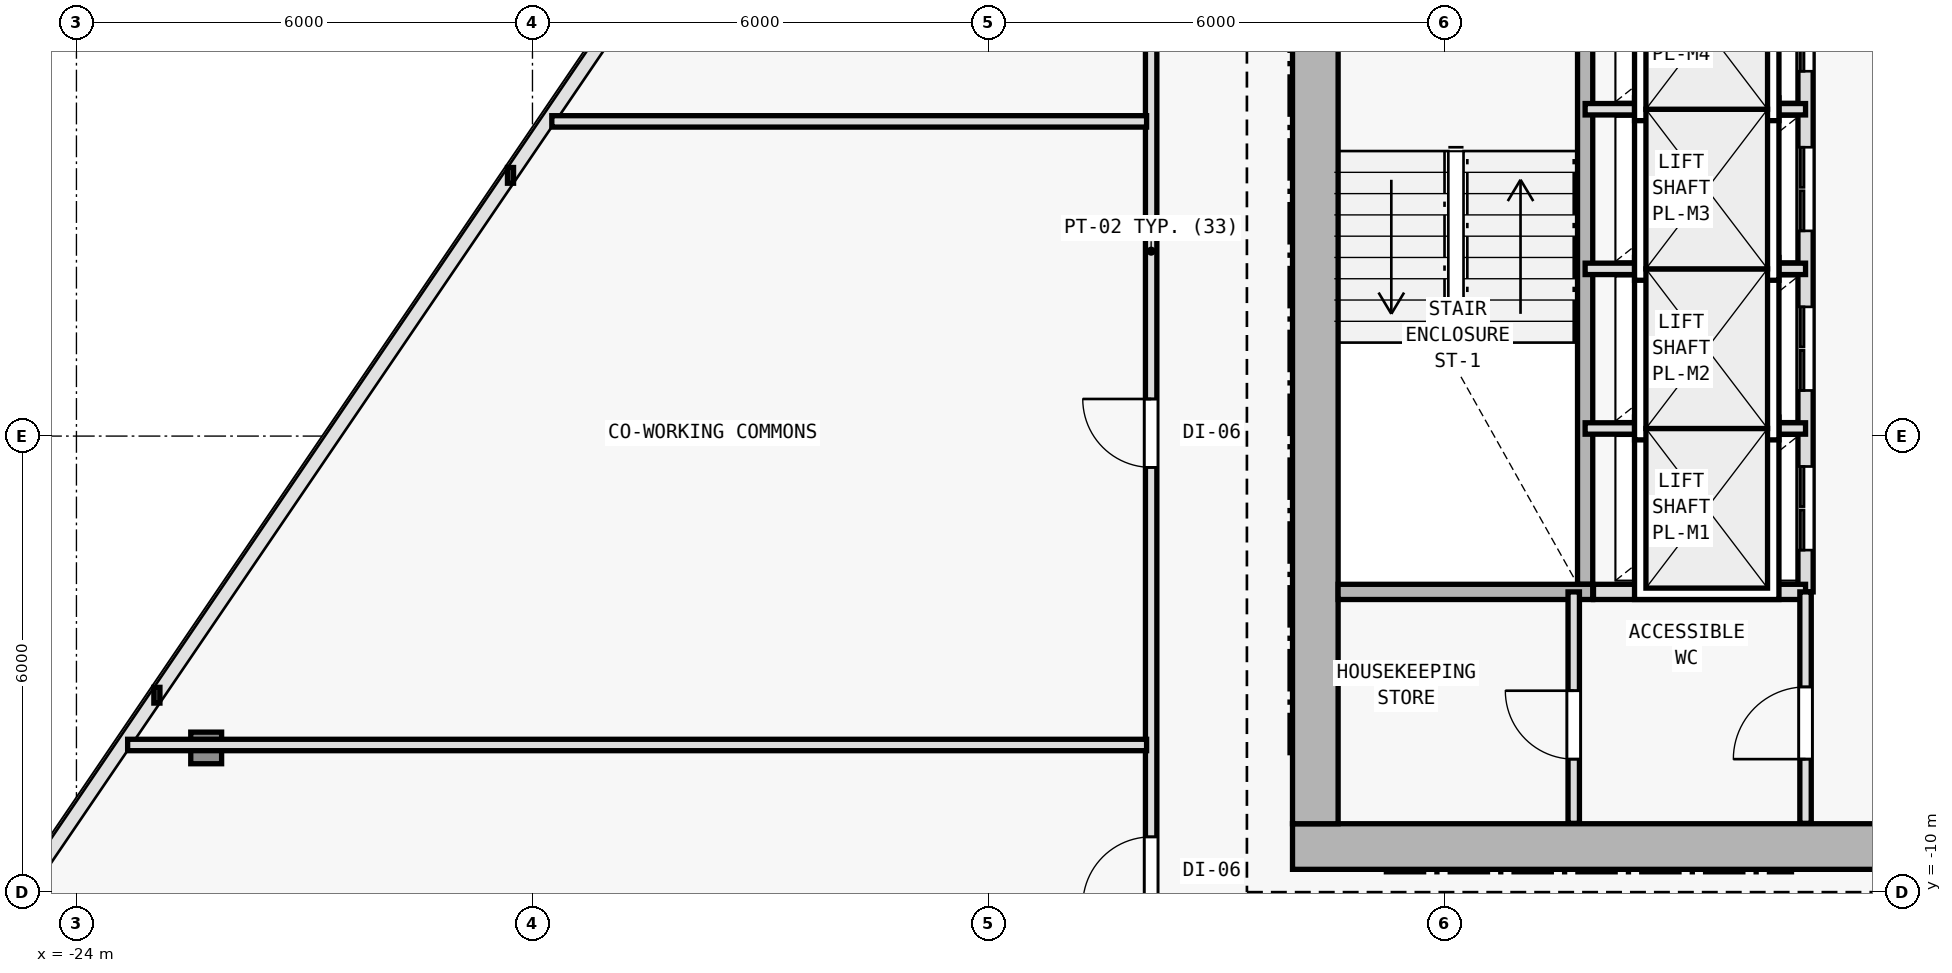
"""IFC4 building model, lengths in metres.
Left out: names, types, materials, properties, quantities, classifications, styles, units other than length and angle.
Written with IfcOpenShell. Run it as: python <this file> out.ifc"""

import sys

from ifc_helpers import new_model, si_unit, direction, frame, frame_2d, origin, origin_2d, place, context, subcontext, project, spatial, rectangle, i_section, extrude, element, fill, save


model = new_model("IFC4")
c1 = context("Model", 3, precision=1e-05, world=origin(), true_north=direction((0.0, 1.0)))
c2 = subcontext(c1, "Body", "Model", "MODEL_VIEW")
j1 = project(units=[si_unit("LENGTHUNIT", "METRE"), si_unit("PLANEANGLEUNIT", "RADIAN")], contexts=[c1])
p1 = place(None, origin())
s1 = spatial("IfcSite", under=j1, at=p1, CompositionType="ELEMENT")
p2 = place(p1, origin())
s2 = spatial("IfcBuilding", under=s1, at=p2, CompositionType="ELEMENT")
p3 = place(p2, frame((0.0, 0.0, 111.3)))
s3 = spatial("IfcBuildingStorey", under=s2, at=p3, CompositionType="ELEMENT", Elevation=111.3)
p4 = place(p3, frame((-7.7, -9.4, 0.0), z_axis=(0.0, 0.0, 1.0), x_axis=(1.0, 0.0, 0.0)))
e1 = element("IfcColumn", 1, at=p4, inside=s3, PredefinedType="COLUMN", context=c2, shape_type="SweptSolid", body=[
    extrude(i_section(OverallWidth=0.409, OverallDepth=0.425, WebThickness=0.021, FlangeThickness=0.034, FilletRadius=0.015, at=origin_2d()), origin(), (0.0, 0.0, 1.0), 3.6),
])
p5 = place(p3, frame((-22.293, -8.103, 0.005), z_axis=(0.025222449659, 0.021619242565, 0.999448065876), x_axis=(-0.650791373456, 0.759256602365, 0.0)))
e2 = element("IfcColumn", 2, at=p5, inside=s3, PredefinedType="COLUMN", context=c2, shape_type="SweptSolid", body=[
    extrude(i_section(OverallWidth=0.406, OverallDepth=0.416, WebThickness=0.019, FlangeThickness=0.031, FilletRadius=0.015, at=origin_2d()), origin(), (0.0, 0.0, 1.0), 3.591),
])
p6 = place(p3, frame((-8.0, -9.4, 0.0), z_axis=(0.0, 0.0, 1.0), x_axis=(1.0, 0.0, 0.0)))
e3 = element("IfcWall", 3, at=p6, inside=s3, PredefinedType="SHEAR", context=c2, shape_type="SweptSolid", body=[
    extrude(rectangle(XDim=16.0, YDim=0.6, at=frame_2d((8.0, 0.0))), origin(), (0.0, 0.0, 1.0), 3.35),
])
p7 = place(p6, frame((9.65, 0.0, 0.0)))
e4 = element("IfcOpeningElement", 4, at=p7, cuts=e3, PredefinedType="OPENING", context=c2, shape_type="SweptSolid", body=[
    extrude(rectangle(XDim=1.5, YDim=2.2, at=frame_2d((0.75, 1.1))), frame((0.0, 0.31, 0.0), z_axis=(0.0, -1.0, 0.0), x_axis=(1.0, 0.0, 0.0)), (0.0, 0.0, 1.0), 0.62),
])
p8 = place(p3, frame((-7.7, -9.1, 0.0), z_axis=(0.0, 0.0, 1.0), x_axis=(0.0, 1.0, 0.0)))
e5 = element("IfcWall", 5, at=p8, inside=s3, PredefinedType="SHEAR", context=c2, shape_type="SweptSolid", body=[
    extrude(rectangle(XDim=19.0, YDim=0.6, at=frame_2d((9.5, 0.0))), origin(), (0.0, 0.0, 1.0), 3.35),
])
p9 = place(p8, frame((12.65, 0.0, 0.0)))
e6 = element("IfcOpeningElement", 6, at=p9, cuts=e5, PredefinedType="OPENING", context=c2, shape_type="SweptSolid", body=[
    extrude(rectangle(XDim=1.1, YDim=2.15, at=frame_2d((0.55, 1.075))), frame((0.0, 0.31, 0.0), z_axis=(0.0, -1.0, 0.0), x_axis=(1.0, 0.0, 0.0)), (0.0, 0.0, 1.0), 0.62),
])
p10 = place(p3, frame((-4.15, -5.95, 0.0), z_axis=(0.0, 0.0, 1.0), x_axis=(0.0, 1.0, 0.0)))
e7 = element("IfcWall", 7, at=p10, inside=s3, PredefinedType="SOLIDWALL", context=c2, shape_type="SweptSolid", body=[
    extrude(rectangle(XDim=7.2, YDim=0.2, at=frame_2d((3.6, 0.0))), origin(), (0.0, 0.0, 1.0), 3.35),
])
p11 = place(p3, frame((-1.25, -6.05, 0.0), z_axis=(0.0, 0.0, 1.0), x_axis=(0.0, 1.0, 0.0)))
e8 = element("IfcWall", 8, at=p11, inside=s3, PredefinedType="SOLIDWALL", context=c2, shape_type="SweptSolid", body=[
    extrude(rectangle(XDim=8.7, YDim=0.2, at=frame_2d((4.35, 0.0))), origin(), (0.0, 0.0, 1.0), 3.35),
])
p12 = place(p11, frame((0.55, 0.0, 0.0)))
e9 = element("IfcOpeningElement", 9, at=p12, cuts=e8, PredefinedType="OPENING", context=c2, shape_type="SweptSolid", body=[
    extrude(rectangle(XDim=1.1, YDim=2.15, at=frame_2d((0.55, 1.075))), frame((0.0, 0.11, 0.0), z_axis=(0.0, -1.0, 0.0), x_axis=(1.0, 0.0, 0.0)), (0.0, 0.0, 1.0), 0.22),
])
p13 = place(p11, frame((2.65, 0.0, 0.0)))
e10 = element("IfcOpeningElement", 10, at=p13, cuts=e8, PredefinedType="OPENING", context=c2, shape_type="SweptSolid", body=[
    extrude(rectangle(XDim=1.1, YDim=2.15, at=frame_2d((0.55, 1.075))), frame((0.0, 0.11, 0.0), z_axis=(0.0, -1.0, 0.0), x_axis=(1.0, 0.0, 0.0)), (0.0, 0.0, 1.0), 0.22),
])
p14 = place(p11, frame((4.75, 0.0, 0.0)))
e11 = element("IfcOpeningElement", 11, at=p14, cuts=e8, PredefinedType="OPENING", context=c2, shape_type="SweptSolid", body=[
    extrude(rectangle(XDim=1.1, YDim=2.15, at=frame_2d((0.55, 1.075))), frame((0.0, 0.11, 0.0), z_axis=(0.0, -1.0, 0.0), x_axis=(1.0, 0.0, 0.0)), (0.0, 0.0, 1.0), 0.22),
])
p15 = place(p11, frame((6.85, 0.0, 0.0)))
e12 = element("IfcOpeningElement", 12, at=p15, cuts=e8, PredefinedType="OPENING", context=c2, shape_type="SweptSolid", body=[
    extrude(rectangle(XDim=1.1, YDim=2.15, at=frame_2d((0.55, 1.075))), frame((0.0, 0.11, 0.0), z_axis=(0.0, -1.0, 0.0), x_axis=(1.0, 0.0, 0.0)), (0.0, 0.0, 1.0), 0.22),
])
for number, where, z_axis, x_axis in (
    (13, (-4.15, -3.9, 0.0), (0.0, 0.0, 1.0), (1.0, 0.0, 0.0)),
    (14, (-4.15, -1.8, 0.0), (0.0, 0.0, 1.0), (1.0, 0.0, 0.0)),
    (15, (-4.15, 0.3, 0.0), (0.0, 0.0, 1.0), (1.0, 0.0, 0.0)),
):
    element("IfcWall", number, at=place(p3, frame(where, z_axis=z_axis, x_axis=x_axis)), inside=s3, PredefinedType="PARTITIONING", context=c2, shape_type="SweptSolid", body=[
        extrude(rectangle(XDim=2.9, YDim=0.15, at=frame_2d((1.45, 0.0))), origin(), (0.0, 0.0, 1.0), 3.35),
    ])
p16 = place(p3, frame((-7.4, -6.05, 0.0), z_axis=(0.0, 0.0, 1.0), x_axis=(1.0, 0.0, 0.0)))
e16 = element("IfcWall", 16, at=p16, inside=s3, PredefinedType="SOLIDWALL", context=c2, shape_type="SweptSolid", body=[
    extrude(rectangle(XDim=3.35, YDim=0.2, at=frame_2d((1.675, 0.0))), origin(), (0.0, 0.0, 1.0), 3.35),
])
p17 = place(p3, frame((-4.04, -6.05, 0.0), z_axis=(0.0, 0.0, 1.0), x_axis=(1.0, 0.0, 0.0)))
e17 = element("IfcWall", 17, at=p17, inside=s3, PredefinedType="SOLIDWALL", context=c2, shape_type="SweptSolid", body=[
    extrude(rectangle(XDim=2.79, YDim=0.2, at=frame_2d((1.395, 0.0))), origin(), (0.0, 0.0, 1.0), 3.35),
])
p18 = place(p3, frame((-1.25, -9.095, 0.0), z_axis=(0.0, 0.0, 1.0), x_axis=(0.0, 1.0, 0.0)))
e18 = element("IfcWall", 18, at=p18, inside=s3, PredefinedType="PARTITIONING", context=c2, shape_type="SweptSolid", body=[
    extrude(rectangle(XDim=3.045, YDim=0.15, at=frame_2d((1.522, 0.0))), origin(), (0.0, 0.0, 1.0), 3.35),
])
p19 = place(p18, frame((0.845, 0.0, 0.0)))
e19 = element("IfcOpeningElement", 19, at=p19, cuts=e18, PredefinedType="OPENING", context=c2, shape_type="SweptSolid", body=[
    extrude(rectangle(XDim=0.95, YDim=2.1, at=frame_2d((0.475, 1.05))), frame((0.0, 0.085, 0.0), z_axis=(0.0, -1.0, 0.0), x_axis=(1.0, 0.0, 0.0)), (0.0, 0.0, 1.0), 0.17),
])
p20 = place(p3, frame((-4.3, -9.095, 0.0), z_axis=(0.0, 0.0, 1.0), x_axis=(0.0, 1.0, 0.0)))
e20 = element("IfcWall", 20, at=p20, inside=s3, PredefinedType="PARTITIONING", context=c2, shape_type="SweptSolid", body=[
    extrude(rectangle(XDim=3.045, YDim=0.15, at=frame_2d((1.522, 0.0))), origin(), (0.0, 0.0, 1.0), 3.35),
])
p21 = place(p20, frame((0.845, 0.0, 0.0)))
e21 = element("IfcOpeningElement", 21, at=p21, cuts=e20, PredefinedType="OPENING", context=c2, shape_type="SweptSolid", body=[
    extrude(rectangle(XDim=0.9, YDim=2.1, at=frame_2d((0.45, 1.05))), frame((0.0, 0.085, 0.0), z_axis=(0.0, -1.0, 0.0), x_axis=(1.0, 0.0, 0.0)), (0.0, 0.0, 1.0), 0.17),
])
p22 = place(p3, frame((-9.86, -11.56, 0.0), z_axis=(0.0, 0.0, 1.0), x_axis=(0.0, 1.0, 0.0)))
e22 = element("IfcWall", 22, at=p22, inside=s3, PredefinedType="PARTITIONING", context=c2, shape_type="SweptSolid", body=[
    extrude(rectangle(XDim=19.986, YDim=0.15, at=frame_2d((9.993, 0.0))), origin(), (0.0, 0.0, 1.0), 2.705),
])
p23 = place(p22, frame((7.148, 0.0, 0.0)))
e23 = element("IfcOpeningElement", 23, at=p23, cuts=e22, PredefinedType="OPENING", context=c2, shape_type="SweptSolid", body=[
    extrude(rectangle(XDim=0.9, YDim=2.1, at=frame_2d((0.45, 1.05))), frame((0.0, 0.085, 0.0), z_axis=(0.0, -1.0, 0.0), x_axis=(1.0, 0.0, 0.0)), (0.0, 0.0, 1.0), 0.17),
])
p24 = place(p22, frame((1.387, 0.0, 0.0)))
e24 = element("IfcOpeningElement", 24, at=p24, cuts=e22, PredefinedType="OPENING", context=c2, shape_type="SweptSolid", body=[
    extrude(rectangle(XDim=0.9, YDim=2.1, at=frame_2d((0.45, 1.05))), frame((0.0, 0.085, 0.0), z_axis=(0.0, -1.0, 0.0), x_axis=(1.0, 0.0, 0.0)), (0.0, 0.0, 1.0), 0.17),
])
p25 = place(p3, frame((-9.92, -8.064, 0.0), z_axis=(0.0, 0.0, 1.0), x_axis=(-1.0, 0.0, 0.0)))
e25 = element("IfcWall", 25, at=p25, inside=s3, PredefinedType="PARTITIONING", context=c2, shape_type="SweptSolid", body=[
    extrude(rectangle(XDim=13.406, YDim=0.15, at=frame_2d((6.703, 0.0))), origin(), (0.0, 0.0, 1.0), 2.705),
])
p26 = place(p3, frame((-9.92, 0.14, 0.0), z_axis=(0.0, 0.0, 1.0), x_axis=(-1.0, 0.0, 0.0)))
e26 = element("IfcWall", 26, at=p26, inside=s3, PredefinedType="PARTITIONING", context=c2, shape_type="SweptSolid", body=[
    extrude(rectangle(XDim=7.825, YDim=0.15, at=frame_2d((3.913, 0.0))), origin(), (0.0, 0.0, 1.0), 2.835),
])
p27 = place(p12, origin())
e27 = element("IfcDoor", 27, at=p27, inside=s3, OperationType="DOUBLE_DOOR_SLIDING", PredefinedType="DOOR", context=c2, shape_type="SweptSolid", body=[
    extrude(rectangle(XDim=1.1, YDim=2.15, at=frame_2d((0.55, 1.075))), frame((0.0, 0.025, 0.0), z_axis=(0.0, -1.0, 0.0), x_axis=(1.0, 0.0, 0.0)), (0.0, 0.0, 1.0), 0.05),
])
fill(e9, e27)
p28 = place(p13, origin())
e28 = element("IfcDoor", 28, at=p28, inside=s3, OperationType="DOUBLE_DOOR_SLIDING", PredefinedType="DOOR", context=c2, shape_type="SweptSolid", body=[
    extrude(rectangle(XDim=1.1, YDim=2.15, at=frame_2d((0.55, 1.075))), frame((0.0, 0.025, 0.0), z_axis=(0.0, -1.0, 0.0), x_axis=(1.0, 0.0, 0.0)), (0.0, 0.0, 1.0), 0.05),
])
fill(e10, e28)
p29 = place(p14, origin())
e29 = element("IfcDoor", 29, at=p29, inside=s3, OperationType="DOUBLE_DOOR_SLIDING", PredefinedType="DOOR", context=c2, shape_type="SweptSolid", body=[
    extrude(rectangle(XDim=1.1, YDim=2.15, at=frame_2d((0.55, 1.075))), frame((0.0, 0.025, 0.0), z_axis=(0.0, -1.0, 0.0), x_axis=(1.0, 0.0, 0.0)), (0.0, 0.0, 1.0), 0.05),
])
fill(e11, e29)
p30 = place(p15, origin())
e30 = element("IfcDoor", 30, at=p30, inside=s3, OperationType="DOUBLE_DOOR_SLIDING", PredefinedType="DOOR", context=c2, shape_type="SweptSolid", body=[
    extrude(rectangle(XDim=1.1, YDim=2.15, at=frame_2d((0.55, 1.075))), frame((0.0, 0.025, 0.0), z_axis=(0.0, -1.0, 0.0), x_axis=(1.0, 0.0, 0.0)), (0.0, 0.0, 1.0), 0.05),
])
fill(e12, e30)
p31 = place(p19, origin())
e31 = element("IfcDoor", 31, at=p31, inside=s3, OperationType="SINGLE_SWING_LEFT", PredefinedType="DOOR", context=c2, shape_type="SweptSolid", body=[
    extrude(rectangle(XDim=0.95, YDim=2.1, at=frame_2d((0.475, 1.05))), frame((0.0, 0.025, 0.0), z_axis=(0.0, -1.0, 0.0), x_axis=(1.0, 0.0, 0.0)), (0.0, 0.0, 1.0), 0.05),
])
fill(e19, e31)
p32 = place(p21, origin())
e32 = element("IfcDoor", 32, at=p32, inside=s3, OperationType="SINGLE_SWING_RIGHT", PredefinedType="DOOR", context=c2, shape_type="SweptSolid", body=[
    extrude(rectangle(XDim=0.9, YDim=2.1, at=frame_2d((0.45, 1.05))), frame((0.0, 0.025, 0.0), z_axis=(0.0, -1.0, 0.0), x_axis=(1.0, 0.0, 0.0)), (0.0, 0.0, 1.0), 0.05),
])
fill(e21, e32)
p33 = place(p23, origin())
e33 = element("IfcDoor", 33, at=p33, inside=s3, OperationType="SINGLE_SWING_RIGHT", PredefinedType="DOOR", context=c2, shape_type="SweptSolid", body=[
    extrude(rectangle(XDim=0.9, YDim=2.1, at=frame_2d((0.45, 1.05))), frame((0.0, 0.025, 0.0), z_axis=(0.0, -1.0, 0.0), x_axis=(1.0, 0.0, 0.0)), (0.0, 0.0, 1.0), 0.05),
])
fill(e23, e33)
p34 = place(p24, origin())
e34 = element("IfcDoor", 34, at=p34, inside=s3, OperationType="SINGLE_SWING_LEFT", PredefinedType="DOOR", context=c2, shape_type="SweptSolid", body=[
    extrude(rectangle(XDim=0.9, YDim=2.1, at=frame_2d((0.45, 1.05))), frame((0.0, 0.025, 0.0), z_axis=(0.0, -1.0, 0.0), x_axis=(1.0, 0.0, 0.0)), (0.0, 0.0, 1.0), 0.05),
])
fill(e24, e34)
save(model, sys.argv[1])
